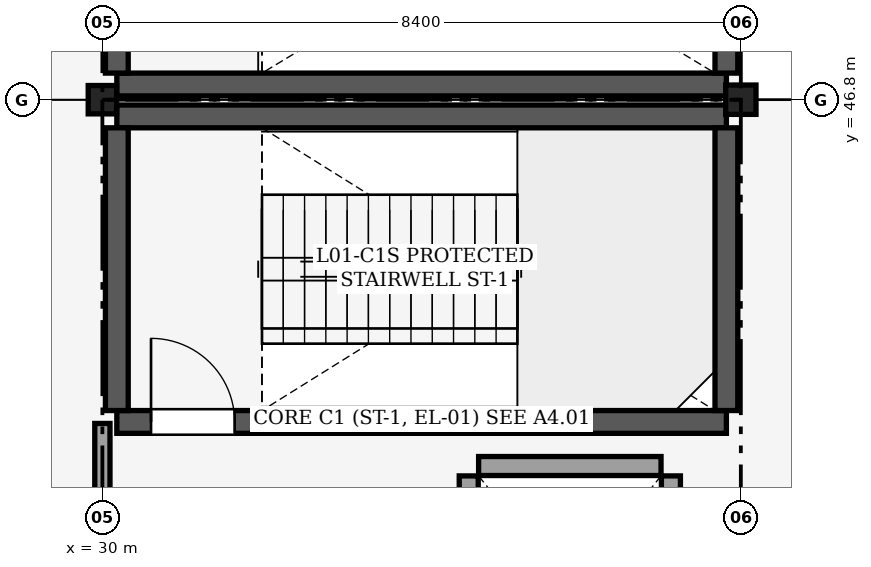
"""IFC4 building model, lengths in metres.
Left out: names, types, materials, properties, quantities, classifications, styles, units other than length and angle.
Written with IfcOpenShell. Run it as: python <this file> out.ifc"""

import sys

from ifc_helpers import new_model, si_unit, direction, frame, frame_2d, origin, origin_2d, place, context, subcontext, project, spatial, rectangle, i_section, extrude, element, fill, save


model = new_model("IFC4")
c1 = context("Model", 3, precision=1e-05, world=origin(), true_north=direction((0.0, 1.0)))
c2 = subcontext(c1, "Body", "Model", "MODEL_VIEW")
j1 = project(units=[si_unit("LENGTHUNIT", "METRE"), si_unit("PLANEANGLEUNIT", "RADIAN")], contexts=[c1])
p1 = place(None, origin())
s1 = spatial("IfcSite", under=j1, at=p1, CompositionType="ELEMENT")
p2 = place(p1, origin())
s2 = spatial("IfcBuilding", under=s1, at=p2, CompositionType="ELEMENT")
p3 = place(p2, frame((0.0, 0.0, 5.4)))
s3 = spatial("IfcBuildingStorey", under=s2, at=p3, CompositionType="ELEMENT", Elevation=5.4)
p4 = place(p3, frame((30.0, 46.8, 0.0), z_axis=(0.0, 0.0, 1.0), x_axis=(1.0, 0.0, 0.0)))
e1 = element("IfcColumn", 1, at=p4, inside=s3, PredefinedType="COLUMN", context=c2, shape_type="SweptSolid", body=[
    extrude(i_section(OverallWidth=0.373, OverallDepth=0.373, WebThickness=0.016, FlangeThickness=0.026, FilletRadius=0.025, at=origin_2d()), origin(), (0.0, 0.0, 1.0), 4.8),
])
p5 = place(p3, frame((38.4, 46.8, 0.0), z_axis=(0.0, 0.0, 1.0), x_axis=(1.0, 0.0, 0.0)))
e2 = element("IfcColumn", 2, at=p5, inside=s3, PredefinedType="COLUMN", context=c2, shape_type="SweptSolid", body=[
    extrude(i_section(OverallWidth=0.399, OverallDepth=0.386, WebThickness=0.021, FlangeThickness=0.033, FilletRadius=0.025, at=origin_2d()), origin(), (0.0, 0.0, 1.0), 4.8),
])
p6 = place(p3, frame((30.19, 42.56, 0.0), z_axis=(0.0, 0.0, 1.0), x_axis=(1.0, 0.0, 0.0)))
e3 = element("IfcWall", 3, at=p6, inside=s3, PredefinedType="SHEAR", context=c2, shape_type="SweptSolid", body=[
    extrude(rectangle(XDim=8.02, YDim=0.3, at=frame_2d((4.01, 0.0))), origin(), (0.0, 0.0, 1.0), 4.54),
])
p7 = place(p6, frame((0.45, 0.0, 0.0)))
e4 = element("IfcOpeningElement", 4, at=p7, cuts=e3, PredefinedType="OPENING", context=c2, shape_type="SweptSolid", body=[
    extrude(rectangle(XDim=1.1, YDim=2.15, at=frame_2d((0.55, 1.075))), frame((0.0, 0.16, 0.0), z_axis=(0.0, -1.0, 0.0), x_axis=(1.0, 0.0, 0.0)), (0.0, 0.0, 1.0), 0.321),
])
p8 = place(p3, frame((30.19, 46.58, 0.0), z_axis=(0.0, 0.0, 1.0), x_axis=(1.0, 0.0, 0.0)))
e5 = element("IfcWall", 5, at=p8, inside=s3, PredefinedType="SHEAR", context=c2, shape_type="SweptSolid", body=[
    extrude(rectangle(XDim=8.02, YDim=0.3, at=frame_2d((4.01, 0.0))), origin(), (0.0, 0.0, 1.0), 4.54),
])
for number, where, z_axis, x_axis in (
    (6, (30.19, 42.71, 0.0), (0.0, 0.0, 1.0), (0.0, 1.0, 0.0)),
    (7, (38.21, 42.71, 0.0), (0.0, 0.0, 1.0), (0.0, 1.0, 0.0)),
):
    element("IfcWall", number, at=place(p3, frame(where, z_axis=z_axis, x_axis=x_axis)), inside=s3, PredefinedType="SHEAR", context=c2, shape_type="SweptSolid", body=[
        extrude(rectangle(XDim=3.72, YDim=0.3, at=frame_2d((1.86, 0.0))), origin(), (0.0, 0.0, 1.0), 4.54),
    ])
p9 = place(p3, frame((37.48, 38.85, 0.0), z_axis=(0.0, 0.0, 1.0), x_axis=(0.0, 1.0, 0.0)))
e8 = element("IfcWall", 8, at=p9, inside=s3, PredefinedType="PARTITIONING", context=c2, shape_type="SweptSolid", body=[
    extrude(rectangle(XDim=3.0, YDim=0.25, at=frame_2d((1.5, 0.0))), origin(), (0.0, 0.0, 1.0), 4.54),
])
p10 = place(p3, frame((34.95, 41.98, 0.0), z_axis=(0.0, 0.0, 1.0), x_axis=(1.0, 0.0, 0.0)))
e9 = element("IfcWall", 9, at=p10, inside=s3, PredefinedType="PARTITIONING", context=c2, shape_type="SweptSolid", body=[
    extrude(rectangle(XDim=2.4, YDim=0.25, at=frame_2d((1.2, 0.0))), origin(), (0.0, 0.0, 1.0), 4.54),
])
p11 = place(p3, frame((34.82, 38.5, 0.0), z_axis=(0.0, 0.0, 1.0), x_axis=(0.0, 1.0, 0.0)))
e10 = element("IfcWall", 10, at=p11, inside=s3, PredefinedType="PARTITIONING", context=c2, shape_type="SweptSolid", body=[
    extrude(rectangle(XDim=3.35, YDim=0.25, at=frame_2d((1.675, 0.0))), origin(), (0.0, 0.0, 1.0), 4.54),
])
p12 = place(p11, frame((0.85, 0.0, 0.0)))
e11 = element("IfcOpeningElement", 11, at=p12, cuts=e10, PredefinedType="OPENING", context=c2, shape_type="SweptSolid", body=[
    extrude(rectangle(XDim=1.25, YDim=2.15, at=frame_2d((0.625, 1.075))), frame((0.0, 0.135, 0.0), z_axis=(0.0, -1.0, 0.0), x_axis=(1.0, 0.0, 0.0)), (0.0, 0.0, 1.0), 0.271),
])
p13 = place(p3, frame((30.0, 38.62, 0.0), z_axis=(0.0, 0.0, 1.0), x_axis=(0.0, 1.0, 0.0)))
e12 = element("IfcWall", 12, at=p13, inside=s3, PredefinedType="PARTITIONING", context=c2, shape_type="SweptSolid", body=[
    extrude(rectangle(XDim=3.92, YDim=0.2, at=frame_2d((1.96, 0.0))), origin(), (0.0, 0.0, 1.0), 3.748),
])
p14 = place(p3, frame((30.19, 47.0, 0.0), z_axis=(0.0, 0.0, 1.0), x_axis=(1.0, 0.0, 0.0)))
e13 = element("IfcWall", 13, at=p14, inside=s3, PredefinedType="SHEAR", context=c2, shape_type="SweptSolid", body=[
    extrude(rectangle(XDim=8.02, YDim=0.3, at=frame_2d((4.01, 0.0))), origin(), (0.0, 0.0, 1.0), 4.54),
])
for number, where, z_axis, x_axis in (
    (14, (30.19, 47.15, 0.0), (0.0, 0.0, 1.0), (0.0, 1.0, 0.0)),
    (15, (38.21, 47.15, 0.0), (0.0, 0.0, 1.0), (0.0, 1.0, 0.0)),
):
    element("IfcWall", number, at=place(p3, frame(where, z_axis=z_axis, x_axis=x_axis)), inside=s3, PredefinedType="SHEAR", context=c2, shape_type="SweptSolid", body=[
        extrude(rectangle(XDim=3.6, YDim=0.3, at=frame_2d((1.8, 0.0))), origin(), (0.0, 0.0, 1.0), 4.54),
    ])
p15 = place(p7, origin())
e16 = element("IfcDoor", 16, at=p15, inside=s3, OperationType="SINGLE_SWING_LEFT", PredefinedType="DOOR", context=c2, shape_type="SweptSolid", body=[
    extrude(rectangle(XDim=1.1, YDim=2.15, at=frame_2d((0.55, 1.075))), frame((0.0, 0.025, 0.0), z_axis=(0.0, -1.0, 0.0), x_axis=(1.0, 0.0, 0.0)), (0.0, 0.0, 1.0), 0.05),
])
fill(e4, e16)
save(model, sys.argv[1])
